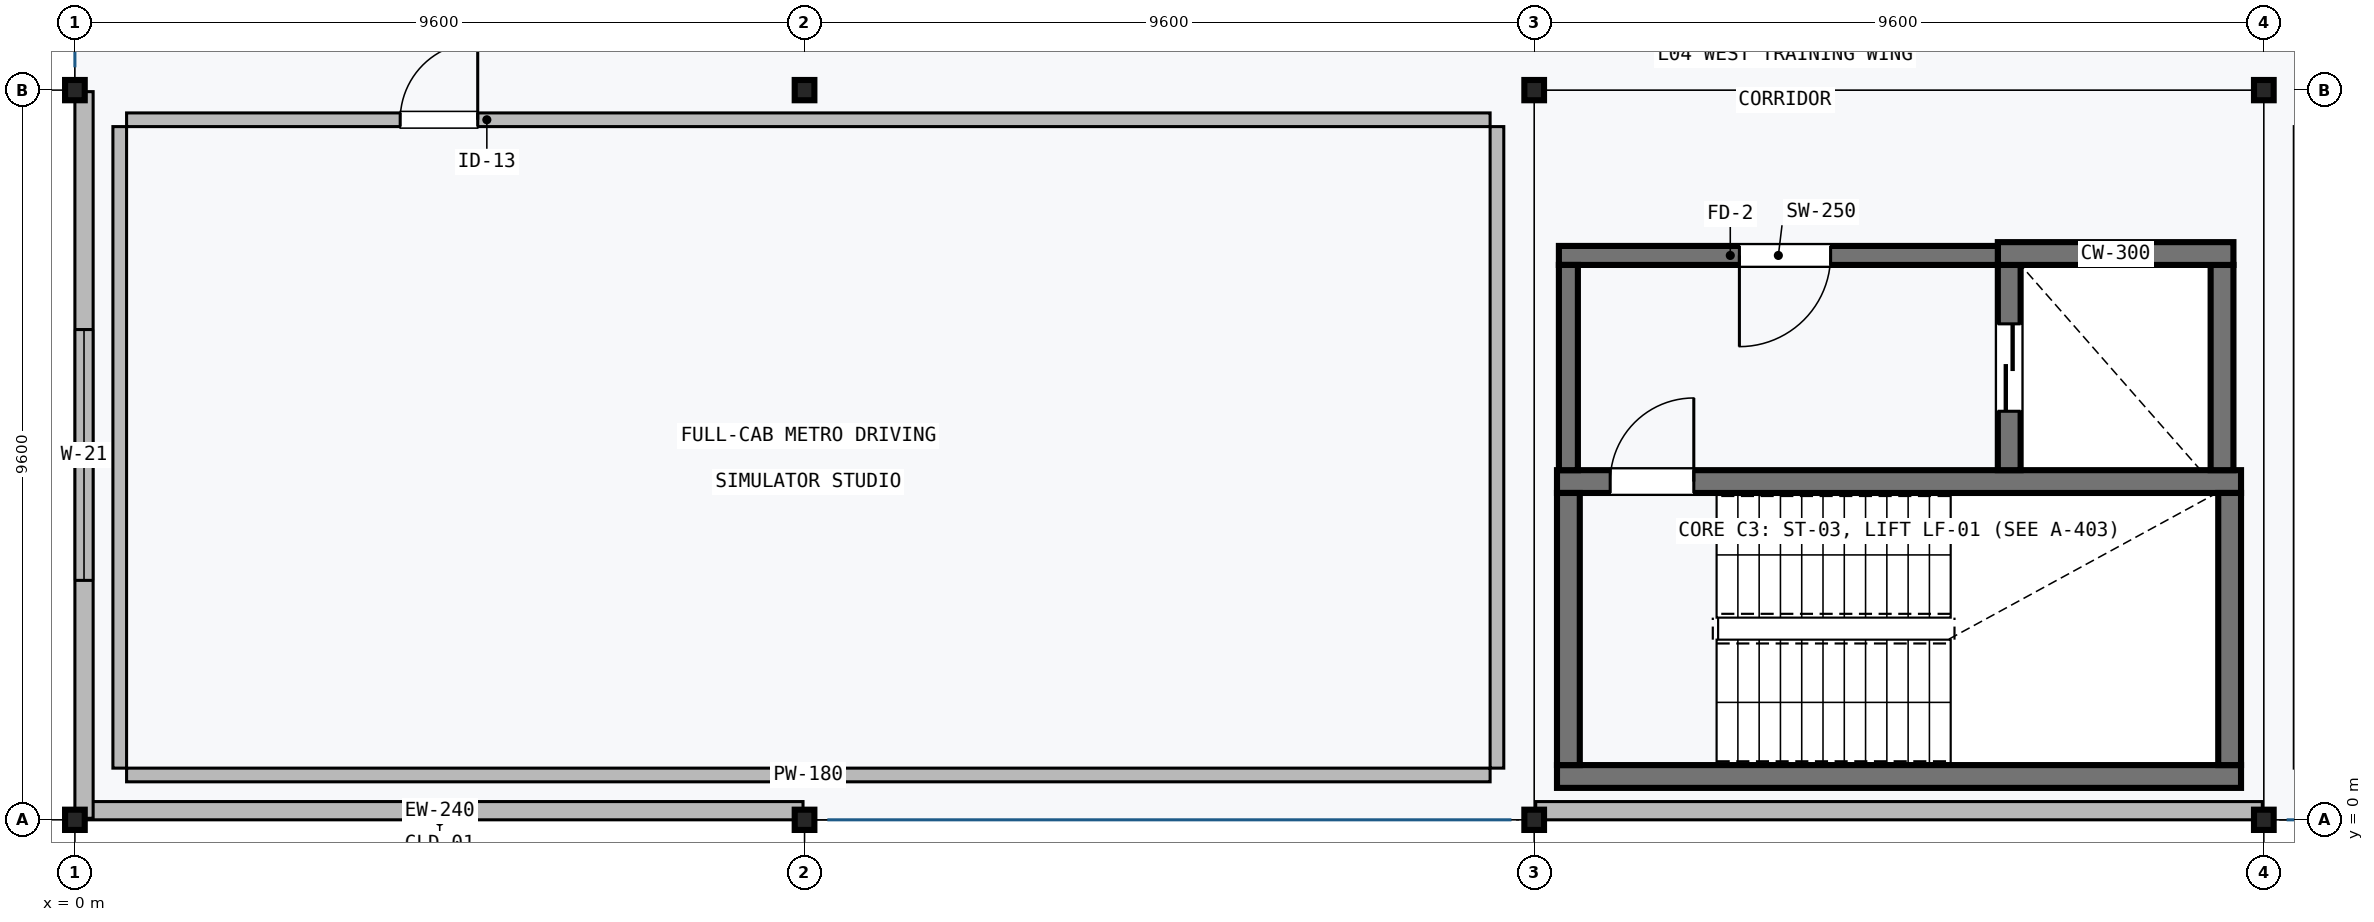
"""IFC4 building model, lengths in metres.
Left out: names, types, materials, properties, quantities, classifications, styles, units other than length and angle.
Written with IfcOpenShell. Run it as: python <this file> out.ifc"""

import sys

from ifc_helpers import new_model, si_unit, direction, frame, frame_2d, origin, origin_2d, place, context, subcontext, project, spatial, rectangle, i_section, extrude, element, fill, save


model = new_model("IFC4")
c1 = context("Model", 3, precision=1e-05, world=origin(), true_north=direction((0.0, 1.0)))
c2 = subcontext(c1, "Body", "Model", "MODEL_VIEW")
j1 = project(units=[si_unit("LENGTHUNIT", "METRE"), si_unit("PLANEANGLEUNIT", "RADIAN")], contexts=[c1])
p1 = place(None, origin())
s1 = spatial("IfcSite", under=j1, at=p1, CompositionType="ELEMENT")
p2 = place(p1, origin())
s2 = spatial("IfcBuilding", under=s1, at=p2, CompositionType="ELEMENT")
p3 = place(p2, frame((0.0, 0.0, 18.9)))
s3 = spatial("IfcBuildingStorey", under=s2, at=p3, CompositionType="ELEMENT", Elevation=18.9)
for number, where, z_axis, x_axis in (
    (1, (0.0, 0.0, 0.0), (0.0, 0.0, 1.0), (1.0, 0.0, 0.0)),
    (2, (0.0, 9.6, 0.0), (0.0, 0.0, 1.0), (1.0, 0.0, 0.0)),
    (3, (9.6, 0.0, 0.0), (0.0, 0.0, 1.0), (1.0, 0.0, 0.0)),
    (4, (9.6, 9.6, 0.0), (0.0, 0.0, 1.0), (1.0, 0.0, 0.0)),
    (5, (19.2, 0.0, 0.0), (0.0, 0.0, 1.0), (1.0, 0.0, 0.0)),
    (6, (19.2, 9.6, 0.0), (0.0, 0.0, 1.0), (1.0, 0.0, 0.0)),
    (7, (28.8, 0.0, 0.0), (0.0, 0.0, 1.0), (1.0, 0.0, 0.0)),
    (8, (28.8, 9.6, 0.0), (0.0, 0.0, 1.0), (1.0, 0.0, 0.0)),
):
    element("IfcColumn", number, at=place(p3, frame(where, z_axis=z_axis, x_axis=x_axis)), inside=s3, PredefinedType="COLUMN", context=c2, shape_type="SweptSolid", body=[
        extrude(i_section(OverallWidth=0.259, OverallDepth=0.267, WebThickness=0.013, FlangeThickness=0.021, FilletRadius=0.013, at=origin_2d()), origin(), (0.0, 0.0, 1.0), 3.95),
    ])
p4 = place(p3, frame((19.5, 0.57, 0.0), z_axis=(0.0, 0.0, 1.0), x_axis=(1.0, 0.0, 0.0)))
e9 = element("IfcWall", 9, at=p4, inside=s3, PredefinedType="SHEAR", context=c2, shape_type="SweptSolid", body=[
    extrude(rectangle(XDim=9.0, YDim=0.3, at=frame_2d((4.5, 0.0))), origin(), (0.0, 0.0, 1.0), 3.95),
])
p5 = place(p3, frame((28.5, 4.45, 0.0), z_axis=(0.0, 0.0, 1.0), x_axis=(-1.0, 0.0, 0.0)))
e10 = element("IfcWall", 10, at=p5, inside=s3, PredefinedType="SHEAR", context=c2, shape_type="SweptSolid", body=[
    extrude(rectangle(XDim=9.0, YDim=0.3, at=frame_2d((4.5, 0.0))), origin(), (0.0, 0.0, 1.0), 3.95),
])
p6 = place(p5, frame((7.2, 0.0, 0.0)))
e11 = element("IfcOpeningElement", 11, at=p6, cuts=e10, PredefinedType="OPENING", context=c2, shape_type="SweptSolid", body=[
    extrude(rectangle(XDim=1.1, YDim=2.15, at=frame_2d((0.55, 1.075))), frame((0.0, 0.16, 0.0), z_axis=(0.0, -1.0, 0.0), x_axis=(1.0, 0.0, 0.0)), (0.0, 0.0, 1.0), 0.32),
])
for number, where, z_axis, x_axis in (
    (12, (19.65, 0.72, 0.0), (0.0, 0.0, 1.0), (0.0, 1.0, 0.0)),
    (13, (28.35, 4.3, 0.0), (0.0, 0.0, 1.0), (0.0, -1.0, 0.0)),
):
    element("IfcWall", number, at=place(p3, frame(where, z_axis=z_axis, x_axis=x_axis)), inside=s3, PredefinedType="SHEAR", context=c2, shape_type="SweptSolid", body=[
        extrude(rectangle(XDim=3.58, YDim=0.3, at=frame_2d((1.79, 0.0))), origin(), (0.0, 0.0, 1.0), 3.95),
    ])
p7 = place(p3, frame((25.45, 7.3, 0.0), z_axis=(0.0, 0.0, 1.0), x_axis=(0.0, -1.0, 0.0)))
e14 = element("IfcWall", 14, at=p7, inside=s3, PredefinedType="SHEAR", context=c2, shape_type="SweptSolid", body=[
    extrude(rectangle(XDim=2.7, YDim=0.3, at=frame_2d((1.35, 0.0))), origin(), (0.0, 0.0, 1.0), 3.95),
])
p8 = place(p7, frame((0.775, 0.0, 0.0)))
e15 = element("IfcOpeningElement", 15, at=p8, cuts=e14, PredefinedType="OPENING", context=c2, shape_type="SweptSolid", body=[
    extrude(rectangle(XDim=1.15, YDim=2.1, at=frame_2d((0.575, 1.05))), frame((0.0, 0.16, 0.0), z_axis=(0.0, -1.0, 0.0), x_axis=(1.0, 0.0, 0.0)), (0.0, 0.0, 1.0), 0.32),
])
p9 = place(p3, frame((28.25, 4.6, 0.0), z_axis=(0.0, 0.0, 1.0), x_axis=(0.0, 1.0, 0.0)))
e16 = element("IfcWall", 16, at=p9, inside=s3, PredefinedType="SHEAR", context=c2, shape_type="SweptSolid", body=[
    extrude(rectangle(XDim=2.7, YDim=0.3, at=frame_2d((1.35, 0.0))), origin(), (0.0, 0.0, 1.0), 3.95),
])
p10 = place(p3, frame((25.3, 7.45, 0.0), z_axis=(0.0, 0.0, 1.0), x_axis=(1.0, 0.0, 0.0)))
e17 = element("IfcWall", 17, at=p10, inside=s3, PredefinedType="SHEAR", context=c2, shape_type="SweptSolid", body=[
    extrude(rectangle(XDim=3.1, YDim=0.3, at=frame_2d((1.55, 0.0))), origin(), (0.0, 0.0, 1.0), 3.95),
])
p11 = place(p3, frame((25.3, 7.425, 0.0), z_axis=(0.0, 0.0, 1.0), x_axis=(-1.0, 0.0, 0.0)))
e18 = element("IfcWall", 18, at=p11, inside=s3, PredefinedType="SHEAR", context=c2, shape_type="SweptSolid", body=[
    extrude(rectangle(XDim=5.775, YDim=0.25, at=frame_2d((2.888, 0.0))), origin(), (0.0, 0.0, 1.0), 3.95),
])
p12 = place(p11, frame((2.2, 0.0, 0.0)))
e19 = element("IfcOpeningElement", 19, at=p12, cuts=e18, PredefinedType="OPENING", context=c2, shape_type="SweptSolid", body=[
    extrude(rectangle(XDim=1.2, YDim=2.15, at=frame_2d((0.6, 1.075))), frame((0.0, 0.135, 0.0), z_axis=(0.0, -1.0, 0.0), x_axis=(1.0, 0.0, 0.0)), (0.0, 0.0, 1.0), 0.27),
])
p13 = place(p3, frame((19.65, 4.6, 0.0), z_axis=(0.0, 0.0, 1.0), x_axis=(0.0, 1.0, 0.0)))
e20 = element("IfcWall", 20, at=p13, inside=s3, PredefinedType="SHEAR", context=c2, shape_type="SweptSolid", body=[
    extrude(rectangle(XDim=2.7, YDim=0.25, at=frame_2d((1.35, 0.0))), origin(), (0.0, 0.0, 1.0), 3.95),
])
p14 = place(p3, frame((9.58, 0.12, 0.0), z_axis=(0.0, 0.0, 1.0), x_axis=(-1.0, 0.0, 0.0)))
e21 = element("IfcWall", 21, at=p14, inside=s3, PredefinedType="SOLIDWALL", context=c2, shape_type="SweptSolid", body=[
    extrude(rectangle(XDim=9.56, YDim=0.24, at=frame_2d((4.78, 0.0))), origin(), (0.0, 0.0, 1.0), 3.66),
])
p15 = place(p3, frame((0.12, 0.02, 0.0), z_axis=(0.0, 0.0, 1.0), x_axis=(0.0, 1.0, 0.0)))
e22 = element("IfcWall", 22, at=p15, inside=s3, PredefinedType="SOLIDWALL", context=c2, shape_type="SweptSolid", body=[
    extrude(rectangle(XDim=9.56, YDim=0.24, at=frame_2d((4.78, 0.0))), origin(), (0.0, 0.0, 1.0), 3.493),
])
p16 = place(p15, frame((3.13, 0.0, 0.9)))
e23 = element("IfcOpeningElement", 23, at=p16, cuts=e22, PredefinedType="OPENING", context=c2, shape_type="SweptSolid", body=[
    extrude(rectangle(XDim=3.3, YDim=2.1, at=frame_2d((1.65, 1.05))), frame((0.0, 0.13, 0.0), z_axis=(0.0, -1.0, 0.0), x_axis=(1.0, 0.0, 0.0)), (0.0, 0.0, 1.0), 0.26),
])
p17 = place(p3, frame((28.78, 0.12, 0.0), z_axis=(0.0, 0.0, 1.0), x_axis=(-1.0, 0.0, 0.0)))
e24 = element("IfcWall", 24, at=p17, inside=s3, PredefinedType="SOLIDWALL", context=c2, shape_type="SweptSolid", body=[
    extrude(rectangle(XDim=9.56, YDim=0.24, at=frame_2d((4.78, 0.0))), origin(), (0.0, 0.0, 1.0), 3.66),
])
p18 = place(p3, frame((18.62, 0.59, 0.0), z_axis=(0.0, 0.0, 1.0), x_axis=(-1.0, 0.0, 0.0)))
e25 = element("IfcWall", 25, at=p18, inside=s3, PredefinedType="PARTITIONING", context=c2, shape_type="SweptSolid", body=[
    extrude(rectangle(XDim=17.94, YDim=0.18, at=frame_2d((8.97, 0.0))), origin(), (0.0, 0.0, 1.0), 3.483),
])
p19 = place(p3, frame((0.68, 9.21, 0.0), z_axis=(0.0, 0.0, 1.0), x_axis=(1.0, 0.0, 0.0)))
e26 = element("IfcWall", 26, at=p19, inside=s3, PredefinedType="PARTITIONING", context=c2, shape_type="SweptSolid", body=[
    extrude(rectangle(XDim=17.94, YDim=0.18, at=frame_2d((8.97, 0.0))), origin(), (0.0, 0.0, 1.0), 3.483),
])
p20 = place(p19, frame((3.6, 0.0, 0.0)))
e27 = element("IfcOpeningElement", 27, at=p20, cuts=e26, PredefinedType="OPENING", context=c2, shape_type="SweptSolid", body=[
    extrude(rectangle(XDim=1.02, YDim=2.2, at=frame_2d((0.51, 1.1))), frame((0.0, 0.1, 0.0), z_axis=(0.0, -1.0, 0.0), x_axis=(1.0, 0.0, 0.0)), (0.0, 0.0, 1.0), 0.2),
])
for number, where, z_axis, x_axis in (
    (28, (0.59, 0.68, 0.0), (0.0, 0.0, 1.0), (0.0, 1.0, 0.0)),
    (29, (18.71, 9.12, 0.0), (0.0, 0.0, 1.0), (0.0, -1.0, 0.0)),
):
    element("IfcWall", number, at=place(p3, frame(where, z_axis=z_axis, x_axis=x_axis)), inside=s3, PredefinedType="PARTITIONING", context=c2, shape_type="SweptSolid", body=[
        extrude(rectangle(XDim=8.44, YDim=0.18, at=frame_2d((4.22, 0.0))), origin(), (0.0, 0.0, 1.0), 3.59),
    ])
p21 = place(p6, frame((1.1, 0.0, 0.0), z_axis=(0.0, 0.0, 1.0), x_axis=(-1.0, 0.0, 0.0)))
e30 = element("IfcDoor", 30, at=p21, inside=s3, OperationType="SINGLE_SWING_LEFT", PredefinedType="DOOR", context=c2, shape_type="SweptSolid", body=[
    extrude(rectangle(XDim=1.1, YDim=2.15, at=frame_2d((0.55, 1.075))), frame((0.0, 0.025, 0.0), z_axis=(0.0, -1.0, 0.0), x_axis=(1.0, 0.0, 0.0)), (0.0, 0.0, 1.0), 0.05),
])
fill(e11, e30)
p22 = place(p8, frame((1.15, 0.0, 0.0), z_axis=(0.0, 0.0, 1.0), x_axis=(-1.0, 0.0, 0.0)))
e31 = element("IfcDoor", 31, at=p22, inside=s3, OperationType="DOUBLE_DOOR_SLIDING", PredefinedType="DOOR", context=c2, shape_type="SweptSolid", body=[
    extrude(rectangle(XDim=1.15, YDim=2.1, at=frame_2d((0.575, 1.05))), frame((0.0, 0.025, 0.0), z_axis=(0.0, -1.0, 0.0), x_axis=(1.0, 0.0, 0.0)), (0.0, 0.0, 1.0), 0.05),
])
fill(e15, e31)
p23 = place(p12, origin())
e32 = element("IfcDoor", 32, at=p23, inside=s3, OperationType="SINGLE_SWING_RIGHT", PredefinedType="DOOR", context=c2, shape_type="SweptSolid", body=[
    extrude(rectangle(XDim=1.2, YDim=2.15, at=frame_2d((0.6, 1.075))), frame((0.0, 0.025, 0.0), z_axis=(0.0, -1.0, 0.0), x_axis=(1.0, 0.0, 0.0)), (0.0, 0.0, 1.0), 0.05),
])
fill(e19, e32)
p24 = place(p16, origin())
e33 = element("IfcWindow", 33, at=p24, inside=s3, PartitioningType="SINGLE_PANEL", PredefinedType="WINDOW", context=c2, shape_type="SweptSolid", body=[
    extrude(rectangle(XDim=3.3, YDim=2.1, at=frame_2d((1.65, 1.05))), frame((0.0, 0.03, 0.0), z_axis=(0.0, -1.0, 0.0), x_axis=(1.0, 0.0, 0.0)), (0.0, 0.0, 1.0), 0.06),
])
fill(e23, e33)
p25 = place(p20, origin())
e34 = element("IfcDoor", 34, at=p25, inside=s3, OperationType="SINGLE_SWING_RIGHT", PredefinedType="DOOR", context=c2, shape_type="SweptSolid", body=[
    extrude(rectangle(XDim=1.02, YDim=2.2, at=frame_2d((0.51, 1.1))), frame((0.0, 0.025, 0.0), z_axis=(0.0, -1.0, 0.0), x_axis=(1.0, 0.0, 0.0)), (0.0, 0.0, 1.0), 0.05),
])
fill(e27, e34)
save(model, sys.argv[1])
